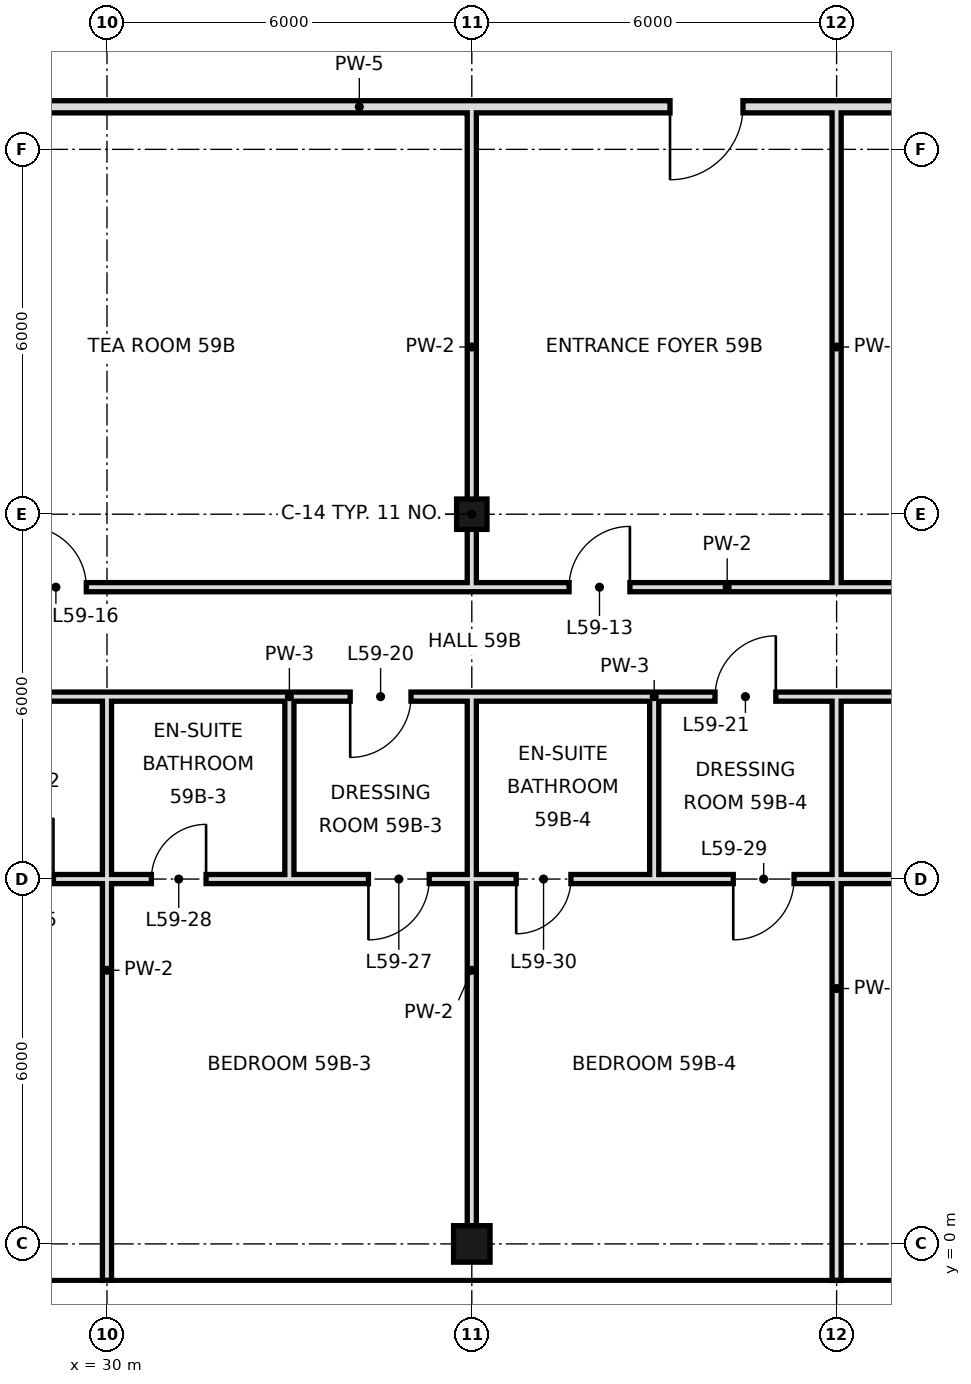
"""IFC4 building model, lengths in metres.
Left out: names, types, materials, properties, quantities, classifications, styles, units other than length and angle.
Written with IfcOpenShell. Run it as: python <this file> out.ifc"""

import sys

from ifc_helpers import new_model, si_unit, direction, frame, frame_2d, origin, origin_2d, place, context, subcontext, project, spatial, rectangle, hollow_rectangle, extrude, element, fill, save


model = new_model("IFC4")
c1 = context("Model", 3, precision=1e-05, world=origin(), true_north=direction((0.0, 1.0)))
c2 = subcontext(c1, "Body", "Model", "MODEL_VIEW")
j1 = project(units=[si_unit("LENGTHUNIT", "METRE"), si_unit("PLANEANGLEUNIT", "RADIAN")], contexts=[c1])
p1 = place(None, origin())
s1 = spatial("IfcSite", under=j1, at=p1, CompositionType="ELEMENT")
p2 = place(p1, origin())
s2 = spatial("IfcBuilding", under=s1, at=p2, CompositionType="ELEMENT")
p3 = place(p2, frame((0.0, 0.0, 250.4)))
s3 = spatial("IfcBuildingStorey", under=s2, at=p3, CompositionType="ELEMENT", Elevation=250.4)
p4 = place(p3, frame((36.0, 0.0, 0.0), z_axis=(0.0, 0.0, 1.0), x_axis=(1.0, 0.0, 0.0)))
e1 = element("IfcColumn", 1, at=p4, inside=s3, PredefinedType="COLUMN", context=c2, shape_type="SweptSolid", body=[
    extrude(hollow_rectangle(XDim=0.6, YDim=0.6, WallThickness=0.028, at=origin_2d()), origin(), (0.0, 0.0, 1.0), 3.6),
])
p5 = place(p3, frame((36.0, 12.0, 0.0), z_axis=(0.0, 0.0, 1.0), x_axis=(1.0, 0.0, 0.0)))
e2 = element("IfcColumn", 2, at=p5, inside=s3, PredefinedType="COLUMN", context=c2, shape_type="SweptSolid", body=[
    extrude(hollow_rectangle(XDim=0.5, YDim=0.5, WallThickness=0.025, at=origin_2d()), origin(), (0.0, 0.0, 1.0), 3.6),
])
p6 = place(p3, frame((30.0, -0.6, 0.0), z_axis=(0.0, 0.0, 1.0), x_axis=(0.0, 1.0, 0.0)))
e3 = element("IfcWall", 3, at=p6, inside=s3, PredefinedType="PARTITIONING", context=c2, shape_type="SweptSolid", body=[
    extrude(rectangle(XDim=6.6, YDim=0.15, at=frame_2d((3.3, 0.0))), origin(), (0.0, 0.0, 1.0), 2.72),
])
p7 = place(p3, frame((30.0, 6.0, 0.0), z_axis=(0.0, 0.0, 1.0), x_axis=(0.0, 1.0, 0.0)))
e4 = element("IfcWall", 4, at=p7, inside=s3, PredefinedType="PARTITIONING", context=c2, shape_type="SweptSolid", body=[
    extrude(rectangle(XDim=3.0, YDim=0.15, at=frame_2d((1.5, 0.0))), origin(), (0.0, 0.0, 1.0), 2.72),
])
p8 = place(p3, frame((33.0, 6.0, 0.0), z_axis=(0.0, 0.0, 1.0), x_axis=(0.0, 1.0, 0.0)))
e5 = element("IfcWall", 5, at=p8, inside=s3, PredefinedType="PARTITIONING", context=c2, shape_type="SweptSolid", body=[
    extrude(rectangle(XDim=3.0, YDim=0.15, at=frame_2d((1.5, 0.0))), origin(), (0.0, 0.0, 1.0), 3.42),
])
p9 = place(p3, frame((36.0, 0.0, 0.0), z_axis=(0.0, 0.0, 1.0), x_axis=(0.0, 1.0, 0.0)))
e6 = element("IfcWall", 6, at=p9, inside=s3, PredefinedType="PARTITIONING", context=c2, shape_type="SweptSolid", body=[
    extrude(rectangle(XDim=6.0, YDim=0.15, at=frame_2d((3.0, 0.0))), origin(), (0.0, 0.0, 1.0), 2.72),
])
p10 = place(p3, frame((36.0, 10.8, 0.0), z_axis=(0.0, 0.0, 1.0), x_axis=(0.0, 1.0, 0.0)))
e7 = element("IfcWall", 7, at=p10, inside=s3, PredefinedType="PARTITIONING", context=c2, shape_type="SweptSolid", body=[
    extrude(rectangle(XDim=7.9, YDim=0.15, at=frame_2d((3.95, 0.0))), origin(), (0.0, 0.0, 1.0), 2.72),
])
p11 = place(p3, frame((36.0, 6.0, 0.0), z_axis=(0.0, 0.0, 1.0), x_axis=(0.0, 1.0, 0.0)))
e8 = element("IfcWall", 8, at=p11, inside=s3, PredefinedType="PARTITIONING", context=c2, shape_type="SweptSolid", body=[
    extrude(rectangle(XDim=3.0, YDim=0.15, at=frame_2d((1.5, 0.0))), origin(), (0.0, 0.0, 1.0), 2.72),
])
p12 = place(p3, frame((39.0, 6.0, 0.0), z_axis=(0.0, 0.0, 1.0), x_axis=(0.0, 1.0, 0.0)))
e9 = element("IfcWall", 9, at=p12, inside=s3, PredefinedType="PARTITIONING", context=c2, shape_type="SweptSolid", body=[
    extrude(rectangle(XDim=3.0, YDim=0.15, at=frame_2d((1.5, 0.0))), origin(), (0.0, 0.0, 1.0), 3.42),
])
p13 = place(p3, frame((42.0, -0.6, 0.0), z_axis=(0.0, 0.0, 1.0), x_axis=(0.0, 1.0, 0.0)))
e10 = element("IfcWall", 10, at=p13, inside=s3, PredefinedType="PARTITIONING", context=c2, shape_type="SweptSolid", body=[
    extrude(rectangle(XDim=9.6, YDim=0.15, at=frame_2d((4.8, 0.0))), origin(), (0.0, 0.0, 1.0), 2.72),
])
p14 = place(p3, frame((42.0, 10.8, 0.0), z_axis=(0.0, 0.0, 1.0), x_axis=(0.0, 1.0, 0.0)))
e11 = element("IfcWall", 11, at=p14, inside=s3, PredefinedType="PARTITIONING", context=c2, shape_type="SweptSolid", body=[
    extrude(rectangle(XDim=7.9, YDim=0.15, at=frame_2d((3.95, 0.0))), origin(), (0.0, 0.0, 1.0), 2.72),
])
p15 = place(p3, frame((25.8, 10.8, 0.0), z_axis=(0.0, 0.0, 1.0), x_axis=(1.0, 0.0, 0.0)))
e12 = element("IfcWall", 12, at=p15, inside=s3, PredefinedType="PARTITIONING", context=c2, shape_type="SweptSolid", body=[
    extrude(rectangle(XDim=28.8, YDim=0.15, at=frame_2d((14.4, 0.0))), origin(), (0.0, 0.0, 1.0), 3.42),
])
p16 = place(p15, frame((11.8, 0.0, 0.0)))
e13 = element("IfcOpeningElement", 13, at=p16, cuts=e12, PredefinedType="OPENING", context=c2, shape_type="SweptSolid", body=[
    extrude(rectangle(XDim=1.0, YDim=2.4, at=frame_2d((0.5, 1.2))), frame((0.0, 0.085, 0.0), z_axis=(0.0, -1.0, 0.0), x_axis=(1.0, 0.0, 0.0)), (0.0, 0.0, 1.0), 0.17),
])
p17 = place(p15, frame((2.86, 0.0, 0.0)))
e14 = element("IfcOpeningElement", 14, at=p17, cuts=e12, PredefinedType="OPENING", context=c2, shape_type="SweptSolid", body=[
    extrude(rectangle(XDim=1.0, YDim=2.4, at=frame_2d((0.5, 1.2))), frame((0.0, 0.085, 0.0), z_axis=(0.0, -1.0, 0.0), x_axis=(1.0, 0.0, 0.0)), (0.0, 0.0, 1.0), 0.17),
])
p18 = place(p15, frame((19.6, 0.0, 0.0)))
e15 = element("IfcOpeningElement", 15, at=p18, cuts=e12, PredefinedType="OPENING", context=c2, shape_type="SweptSolid", body=[
    extrude(rectangle(XDim=1.0, YDim=2.4, at=frame_2d((0.5, 1.2))), frame((0.0, 0.085, 0.0), z_axis=(0.0, -1.0, 0.0), x_axis=(1.0, 0.0, 0.0)), (0.0, 0.0, 1.0), 0.17),
])
p19 = place(p3, frame((23.4, 18.7, 0.0), z_axis=(0.0, 0.0, 1.0), x_axis=(1.0, 0.0, 0.0)))
e16 = element("IfcWall", 16, at=p19, inside=s3, PredefinedType="SOLIDWALL", context=c2, shape_type="SweptSolid", body=[
    extrude(rectangle(XDim=21.5, YDim=0.2, at=frame_2d((10.75, 0.0))), origin(), (0.0, 0.0, 1.0), 2.72),
])
p20 = place(p19, frame((15.86, 0.0, 0.0)))
e17 = element("IfcOpeningElement", 17, at=p20, cuts=e16, PredefinedType="OPENING", context=c2, shape_type="SweptSolid", body=[
    extrude(rectangle(XDim=1.2, YDim=2.4, at=frame_2d((0.6, 1.2))), frame((0.0, 0.11, 0.0), z_axis=(0.0, -1.0, 0.0), x_axis=(1.0, 0.0, 0.0)), (0.0, 0.0, 1.0), 0.22),
])
p21 = place(p3, frame((26.4, 6.0, 0.0), z_axis=(0.0, 0.0, 1.0), x_axis=(1.0, 0.0, 0.0)))
e18 = element("IfcWall", 18, at=p21, inside=s3, PredefinedType="PARTITIONING", context=c2, shape_type="SweptSolid", body=[
    extrude(rectangle(XDim=3.6, YDim=0.15, at=frame_2d((1.8, 0.0))), origin(), (0.0, 0.0, 1.0), 2.97),
])
p22 = place(p21, frame((1.72, 0.0, 0.0)))
e19 = element("IfcOpeningElement", 19, at=p22, cuts=e18, PredefinedType="OPENING", context=c2, shape_type="SweptSolid", body=[
    extrude(rectangle(XDim=1.0, YDim=2.4, at=frame_2d((0.5, 1.2))), frame((0.0, 0.085, 0.0), z_axis=(0.0, -1.0, 0.0), x_axis=(1.0, 0.0, 0.0)), (0.0, 0.0, 1.0), 0.17),
])
p23 = place(p3, frame((33.0, 6.0, 0.0), z_axis=(0.0, 0.0, 1.0), x_axis=(1.0, 0.0, 0.0)))
e20 = element("IfcWall", 20, at=p23, inside=s3, PredefinedType="PARTITIONING", context=c2, shape_type="SweptSolid", body=[
    extrude(rectangle(XDim=3.0, YDim=0.15, at=frame_2d((1.5, 0.0))), origin(), (0.0, 0.0, 1.0), 2.97),
])
p24 = place(p23, frame((1.3, 0.0, 0.0)))
e21 = element("IfcOpeningElement", 21, at=p24, cuts=e20, PredefinedType="OPENING", context=c2, shape_type="SweptSolid", body=[
    extrude(rectangle(XDim=1.0, YDim=2.4, at=frame_2d((0.5, 1.2))), frame((0.0, 0.085, 0.0), z_axis=(0.0, -1.0, 0.0), x_axis=(1.0, 0.0, 0.0)), (0.0, 0.0, 1.0), 0.17),
])
p25 = place(p3, frame((39.0, 6.0, 0.0), z_axis=(0.0, 0.0, 1.0), x_axis=(1.0, 0.0, 0.0)))
e22 = element("IfcWall", 22, at=p25, inside=s3, PredefinedType="PARTITIONING", context=c2, shape_type="SweptSolid", body=[
    extrude(rectangle(XDim=15.0, YDim=0.15, at=frame_2d((7.5, 0.0))), origin(), (0.0, 0.0, 1.0), 2.97),
])
p26 = place(p25, frame((1.3, 0.0, 0.0)))
e23 = element("IfcOpeningElement", 23, at=p26, cuts=e22, PredefinedType="OPENING", context=c2, shape_type="SweptSolid", body=[
    extrude(rectangle(XDim=1.0, YDim=2.4, at=frame_2d((0.5, 1.2))), frame((0.0, 0.085, 0.0), z_axis=(0.0, -1.0, 0.0), x_axis=(1.0, 0.0, 0.0)), (0.0, 0.0, 1.0), 0.17),
])
p27 = place(p25, frame((6.16, 0.0, 0.0)))
e24 = element("IfcOpeningElement", 24, at=p27, cuts=e22, PredefinedType="OPENING", context=c2, shape_type="SweptSolid", body=[
    extrude(rectangle(XDim=1.8, YDim=2.4, at=frame_2d((0.9, 1.2))), frame((0.0, 0.085, 0.0), z_axis=(0.0, -1.0, 0.0), x_axis=(1.0, 0.0, 0.0)), (0.0, 0.0, 1.0), 0.17),
])
p28 = place(p3, frame((30.0, 6.0, 0.0), z_axis=(0.0, 0.0, 1.0), x_axis=(1.0, 0.0, 0.0)))
e25 = element("IfcWall", 25, at=p28, inside=s3, PredefinedType="PARTITIONING", context=c2, shape_type="SweptSolid", body=[
    extrude(rectangle(XDim=3.0, YDim=0.15, at=frame_2d((1.5, 0.0))), origin(), (0.0, 0.0, 1.0), 2.97),
])
p29 = place(p28, frame((0.73, 0.0, 0.0)))
e26 = element("IfcOpeningElement", 26, at=p29, cuts=e25, PredefinedType="OPENING", context=c2, shape_type="SweptSolid", body=[
    extrude(rectangle(XDim=0.9, YDim=2.4, at=frame_2d((0.45, 1.2))), frame((0.0, 0.085, 0.0), z_axis=(0.0, -1.0, 0.0), x_axis=(1.0, 0.0, 0.0)), (0.0, 0.0, 1.0), 0.17),
])
p30 = place(p3, frame((36.0, 6.0, 0.0), z_axis=(0.0, 0.0, 1.0), x_axis=(1.0, 0.0, 0.0)))
e27 = element("IfcWall", 27, at=p30, inside=s3, PredefinedType="PARTITIONING", context=c2, shape_type="SweptSolid", body=[
    extrude(rectangle(XDim=3.0, YDim=0.15, at=frame_2d((1.5, 0.0))), origin(), (0.0, 0.0, 1.0), 2.97),
])
p31 = place(p30, frame((0.73, 0.0, 0.0)))
e28 = element("IfcOpeningElement", 28, at=p31, cuts=e27, PredefinedType="OPENING", context=c2, shape_type="SweptSolid", body=[
    extrude(rectangle(XDim=0.9, YDim=2.4, at=frame_2d((0.45, 1.2))), frame((0.0, 0.085, 0.0), z_axis=(0.0, -1.0, 0.0), x_axis=(1.0, 0.0, 0.0)), (0.0, 0.0, 1.0), 0.17),
])
p32 = place(p3, frame((26.4, 9.0, 0.0), z_axis=(0.0, 0.0, 1.0), x_axis=(1.0, 0.0, 0.0)))
e29 = element("IfcWall", 29, at=p32, inside=s3, PredefinedType="PARTITIONING", context=c2, shape_type="SweptSolid", body=[
    extrude(rectangle(XDim=3.6, YDim=0.15, at=frame_2d((1.8, 0.0))), origin(), (0.0, 0.0, 1.0), 3.42),
])
p33 = place(p32, frame((1.3, 0.0, 0.0)))
e30 = element("IfcOpeningElement", 30, at=p33, cuts=e29, PredefinedType="OPENING", context=c2, shape_type="SweptSolid", body=[
    extrude(rectangle(XDim=1.0, YDim=2.4, at=frame_2d((0.5, 1.2))), frame((0.0, 0.085, 0.0), z_axis=(0.0, -1.0, 0.0), x_axis=(1.0, 0.0, 0.0)), (0.0, 0.0, 1.0), 0.17),
])
p34 = place(p3, frame((33.0, 9.0, 0.0), z_axis=(0.0, 0.0, 1.0), x_axis=(1.0, 0.0, 0.0)))
e31 = element("IfcWall", 31, at=p34, inside=s3, PredefinedType="PARTITIONING", context=c2, shape_type="SweptSolid", body=[
    extrude(rectangle(XDim=3.0, YDim=0.15, at=frame_2d((1.5, 0.0))), origin(), (0.0, 0.0, 1.0), 3.42),
])
p35 = place(p34, frame((1.0, 0.0, 0.0)))
e32 = element("IfcOpeningElement", 32, at=p35, cuts=e31, PredefinedType="OPENING", context=c2, shape_type="SweptSolid", body=[
    extrude(rectangle(XDim=1.0, YDim=2.4, at=frame_2d((0.5, 1.2))), frame((0.0, 0.085, 0.0), z_axis=(0.0, -1.0, 0.0), x_axis=(1.0, 0.0, 0.0)), (0.0, 0.0, 1.0), 0.17),
])
p36 = place(p3, frame((39.0, 9.0, 0.0), z_axis=(0.0, 0.0, 1.0), x_axis=(1.0, 0.0, 0.0)))
e33 = element("IfcWall", 33, at=p36, inside=s3, PredefinedType="PARTITIONING", context=c2, shape_type="SweptSolid", body=[
    extrude(rectangle(XDim=15.6, YDim=0.15, at=frame_2d((7.8, 0.0))), origin(), (0.0, 0.0, 1.0), 3.42),
])
p37 = place(p36, frame((1.0, 0.0, 0.0)))
e34 = element("IfcOpeningElement", 34, at=p37, cuts=e33, PredefinedType="OPENING", context=c2, shape_type="SweptSolid", body=[
    extrude(rectangle(XDim=1.0, YDim=2.4, at=frame_2d((0.5, 1.2))), frame((0.0, 0.085, 0.0), z_axis=(0.0, -1.0, 0.0), x_axis=(1.0, 0.0, 0.0)), (0.0, 0.0, 1.0), 0.17),
])
p38 = place(p36, frame((10.04, 0.0, 0.0)))
e35 = element("IfcOpeningElement", 35, at=p38, cuts=e33, PredefinedType="OPENING", context=c2, shape_type="SweptSolid", body=[
    extrude(rectangle(XDim=1.8, YDim=2.4, at=frame_2d((0.9, 1.2))), frame((0.0, 0.085, 0.0), z_axis=(0.0, -1.0, 0.0), x_axis=(1.0, 0.0, 0.0)), (0.0, 0.0, 1.0), 0.17),
])
for number, where, z_axis, x_axis in (
    (36, (30.0, 9.0, 0.0), (0.0, 0.0, 1.0), (1.0, 0.0, 0.0)),
    (37, (36.0, 9.0, 0.0), (0.0, 0.0, 1.0), (1.0, 0.0, 0.0)),
):
    element("IfcWall", number, at=place(p3, frame(where, z_axis=z_axis, x_axis=x_axis)), inside=s3, PredefinedType="PARTITIONING", context=c2, shape_type="SweptSolid", body=[
        extrude(rectangle(XDim=3.0, YDim=0.15, at=frame_2d((1.5, 0.0))), origin(), (0.0, 0.0, 1.0), 3.42),
    ])
p39 = place(p16, frame((1.0, 0.0, 0.0), z_axis=(0.0, 0.0, 1.0), x_axis=(-1.0, 0.0, 0.0)))
e38 = element("IfcDoor", 38, at=p39, inside=s3, OperationType="SINGLE_SWING_LEFT", PredefinedType="DOOR", context=c2, shape_type="SweptSolid", body=[
    extrude(rectangle(XDim=1.0, YDim=2.4, at=frame_2d((0.5, 1.2))), frame((0.0, 0.025, 0.0), z_axis=(0.0, -1.0, 0.0), x_axis=(1.0, 0.0, 0.0)), (0.0, 0.0, 1.0), 0.05),
])
fill(e13, e38)
p40 = place(p17, origin())
e39 = element("IfcDoor", 39, at=p40, inside=s3, OperationType="SINGLE_SWING_LEFT", PredefinedType="DOOR", context=c2, shape_type="SweptSolid", body=[
    extrude(rectangle(XDim=1.0, YDim=2.4, at=frame_2d((0.5, 1.2))), frame((0.0, 0.025, 0.0), z_axis=(0.0, -1.0, 0.0), x_axis=(1.0, 0.0, 0.0)), (0.0, 0.0, 1.0), 0.05),
])
fill(e14, e39)
p41 = place(p35, frame((1.0, 0.0, 0.0), z_axis=(0.0, 0.0, 1.0), x_axis=(-1.0, 0.0, 0.0)))
e40 = element("IfcDoor", 40, at=p41, inside=s3, OperationType="SINGLE_SWING_RIGHT", PredefinedType="DOOR", context=c2, shape_type="SweptSolid", body=[
    extrude(rectangle(XDim=1.0, YDim=2.4, at=frame_2d((0.5, 1.2))), frame((0.0, 0.025, 0.0), z_axis=(0.0, -1.0, 0.0), x_axis=(1.0, 0.0, 0.0)), (0.0, 0.0, 1.0), 0.05),
])
fill(e32, e40)
p42 = place(p37, frame((1.0, 0.0, 0.0), z_axis=(0.0, 0.0, 1.0), x_axis=(-1.0, 0.0, 0.0)))
e41 = element("IfcDoor", 41, at=p42, inside=s3, OperationType="SINGLE_SWING_LEFT", PredefinedType="DOOR", context=c2, shape_type="SweptSolid", body=[
    extrude(rectangle(XDim=1.0, YDim=2.4, at=frame_2d((0.5, 1.2))), frame((0.0, 0.025, 0.0), z_axis=(0.0, -1.0, 0.0), x_axis=(1.0, 0.0, 0.0)), (0.0, 0.0, 1.0), 0.05),
])
fill(e34, e41)
p43 = place(p22, frame((1.0, 0.0, 0.0), z_axis=(0.0, 0.0, 1.0), x_axis=(-1.0, 0.0, 0.0)))
e42 = element("IfcDoor", 42, at=p43, inside=s3, OperationType="SINGLE_SWING_LEFT", PredefinedType="DOOR", context=c2, shape_type="SweptSolid", body=[
    extrude(rectangle(XDim=1.0, YDim=2.4, at=frame_2d((0.5, 1.2))), frame((0.0, 0.025, 0.0), z_axis=(0.0, -1.0, 0.0), x_axis=(1.0, 0.0, 0.0)), (0.0, 0.0, 1.0), 0.05),
])
fill(e19, e42)
p44 = place(p24, frame((1.0, 0.0, 0.0), z_axis=(0.0, 0.0, 1.0), x_axis=(-1.0, 0.0, 0.0)))
e43 = element("IfcDoor", 43, at=p44, inside=s3, OperationType="SINGLE_SWING_RIGHT", PredefinedType="DOOR", context=c2, shape_type="SweptSolid", body=[
    extrude(rectangle(XDim=1.0, YDim=2.4, at=frame_2d((0.5, 1.2))), frame((0.0, 0.025, 0.0), z_axis=(0.0, -1.0, 0.0), x_axis=(1.0, 0.0, 0.0)), (0.0, 0.0, 1.0), 0.05),
])
fill(e21, e43)
p45 = place(p29, frame((0.9, 0.0, 0.0), z_axis=(0.0, 0.0, 1.0), x_axis=(-1.0, 0.0, 0.0)))
e44 = element("IfcDoor", 44, at=p45, inside=s3, OperationType="SINGLE_SWING_LEFT", PredefinedType="DOOR", context=c2, shape_type="SweptSolid", body=[
    extrude(rectangle(XDim=0.9, YDim=2.4, at=frame_2d((0.45, 1.2))), frame((0.0, 0.025, 0.0), z_axis=(0.0, -1.0, 0.0), x_axis=(1.0, 0.0, 0.0)), (0.0, 0.0, 1.0), 0.05),
])
fill(e26, e44)
p46 = place(p26, frame((1.0, 0.0, 0.0), z_axis=(0.0, 0.0, 1.0), x_axis=(-1.0, 0.0, 0.0)))
e45 = element("IfcDoor", 45, at=p46, inside=s3, OperationType="SINGLE_SWING_RIGHT", PredefinedType="DOOR", context=c2, shape_type="SweptSolid", body=[
    extrude(rectangle(XDim=1.0, YDim=2.4, at=frame_2d((0.5, 1.2))), frame((0.0, 0.025, 0.0), z_axis=(0.0, -1.0, 0.0), x_axis=(1.0, 0.0, 0.0)), (0.0, 0.0, 1.0), 0.05),
])
fill(e23, e45)
p47 = place(p31, frame((0.9, 0.0, 0.0), z_axis=(0.0, 0.0, 1.0), x_axis=(-1.0, 0.0, 0.0)))
e46 = element("IfcDoor", 46, at=p47, inside=s3, OperationType="SINGLE_SWING_RIGHT", PredefinedType="DOOR", context=c2, shape_type="SweptSolid", body=[
    extrude(rectangle(XDim=0.9, YDim=2.4, at=frame_2d((0.45, 1.2))), frame((0.0, 0.025, 0.0), z_axis=(0.0, -1.0, 0.0), x_axis=(1.0, 0.0, 0.0)), (0.0, 0.0, 1.0), 0.05),
])
fill(e28, e46)
p48 = place(p20, frame((1.2, 0.0, 0.0), z_axis=(0.0, 0.0, 1.0), x_axis=(-1.0, 0.0, 0.0)))
e47 = element("IfcDoor", 47, at=p48, inside=s3, OperationType="SINGLE_SWING_RIGHT", PredefinedType="DOOR", context=c2, shape_type="SweptSolid", body=[
    extrude(rectangle(XDim=1.2, YDim=2.4, at=frame_2d((0.6, 1.2))), frame((0.0, 0.025, 0.0), z_axis=(0.0, -1.0, 0.0), x_axis=(1.0, 0.0, 0.0)), (0.0, 0.0, 1.0), 0.05),
])
fill(e17, e47)
save(model, sys.argv[1])
